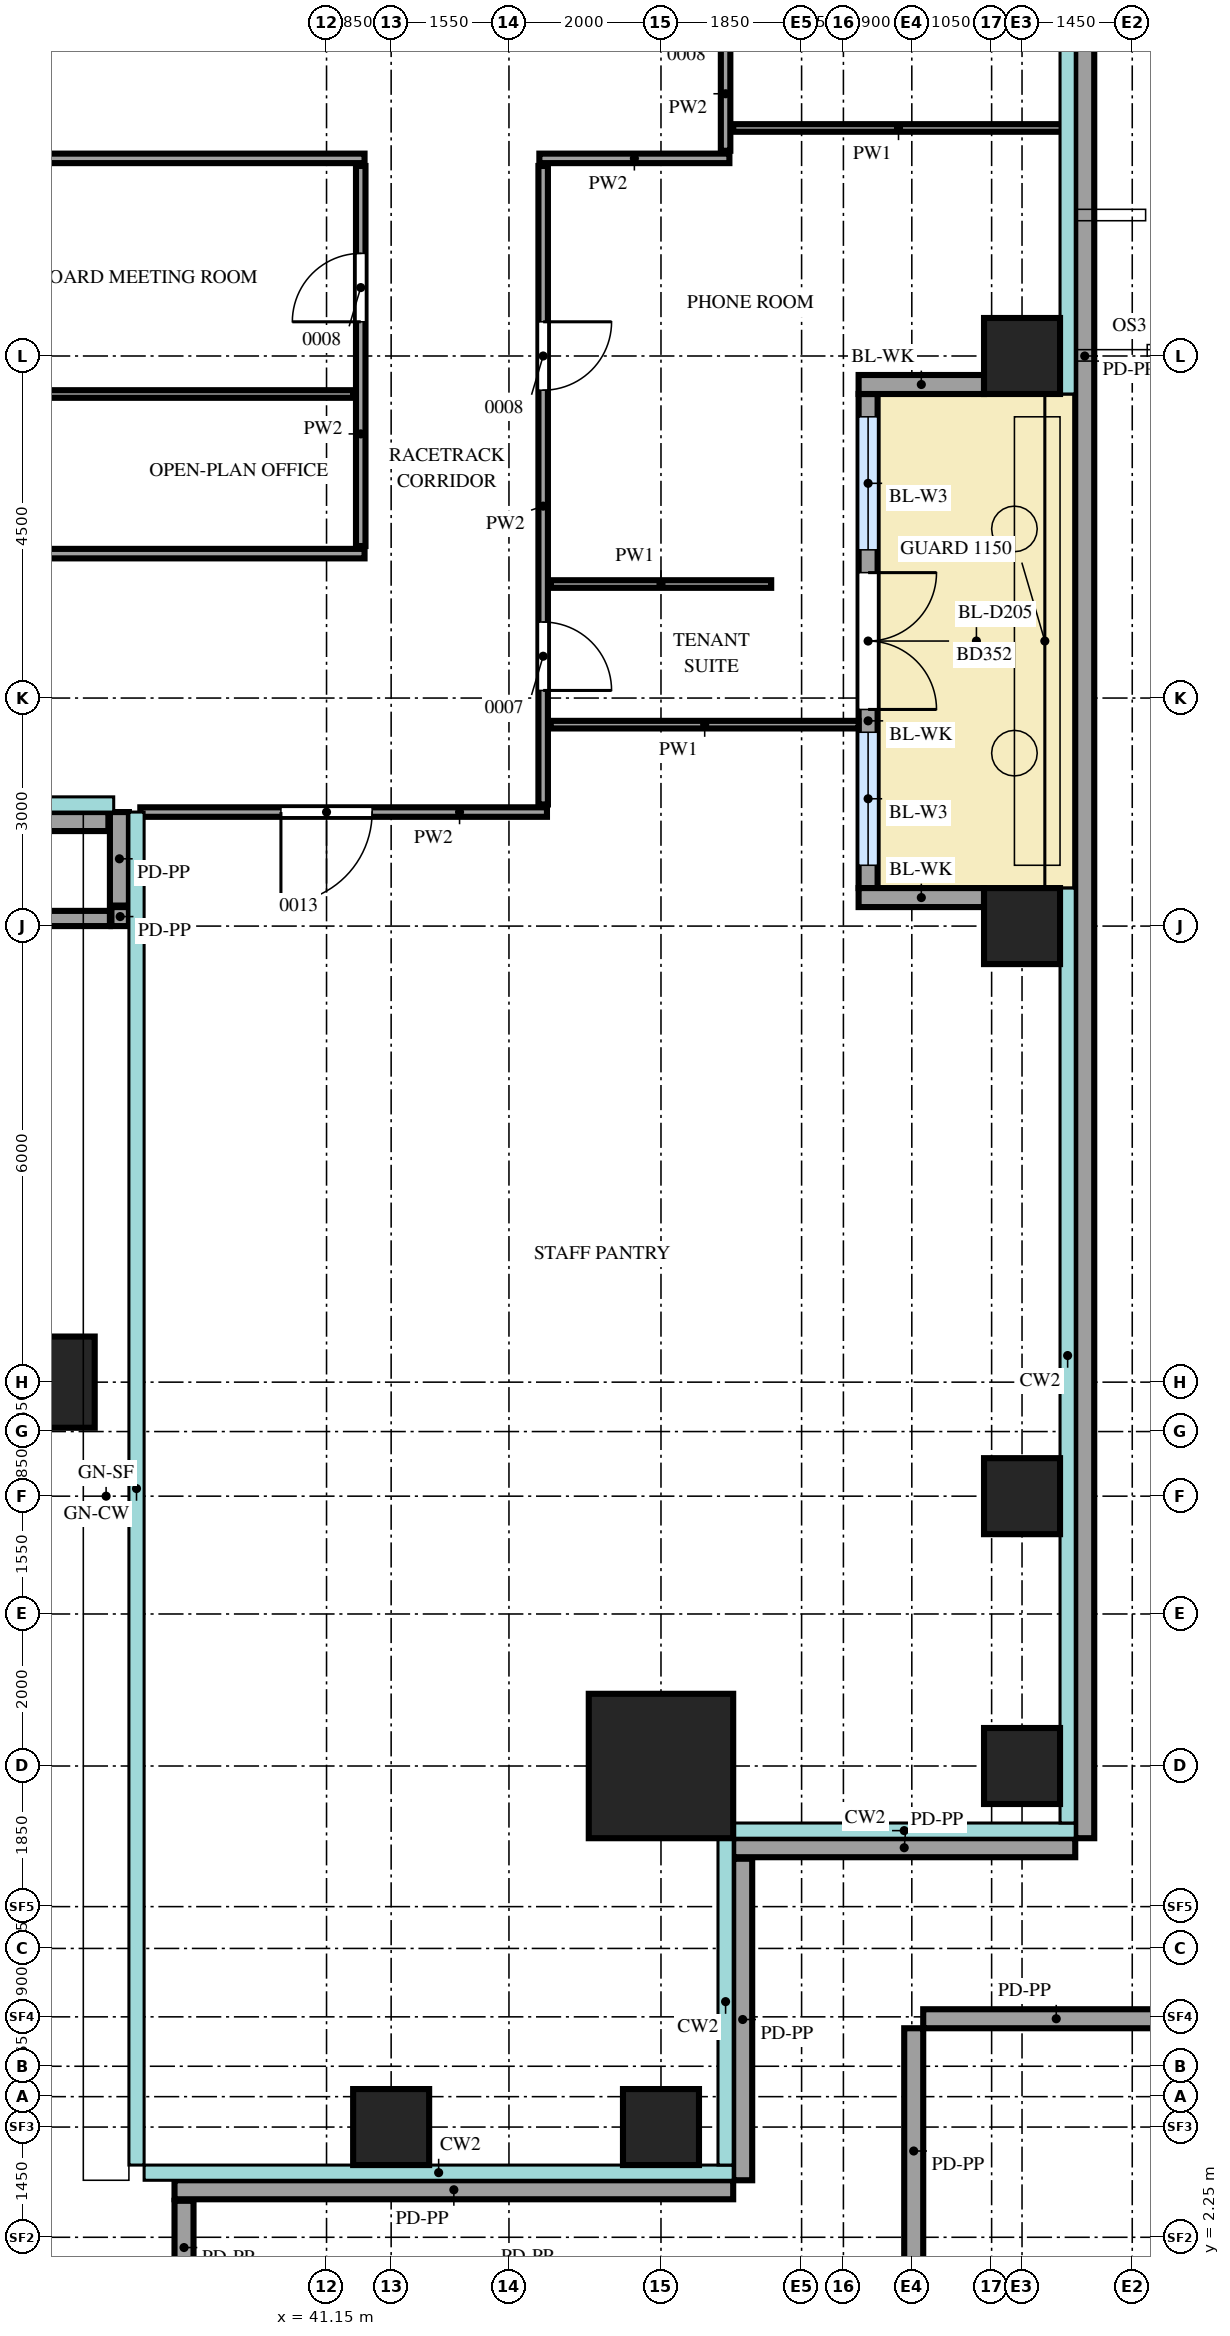
"""IFC4 building model, lengths in metres.
Left out: names, types, materials, properties, quantities, classifications, styles, units other than length and angle.
Written with IfcOpenShell. Run it as: python <this file> out.ifc"""

import sys

from ifc_helpers import new_model, si_unit, direction, frame, frame_2d, origin, origin_2d, place, context, subcontext, project, spatial, rectangle, extrude, source, transform, mapped, element, fill, save


model = new_model("IFC4")
c1 = context("Model", 3, precision=1e-05, world=origin(), true_north=direction((0.0, 1.0)))
c2 = subcontext(c1, "Body", "Model", "MODEL_VIEW")
j1 = project(units=[si_unit("LENGTHUNIT", "METRE"), si_unit("PLANEANGLEUNIT", "RADIAN")], contexts=[c1])
p1 = place(None, origin())
s1 = spatial("IfcSite", under=j1, at=p1, CompositionType="ELEMENT")
p2 = place(p1, origin())
s2 = spatial("IfcBuilding", under=s1, at=p2, CompositionType="ELEMENT")
p3 = place(p2, frame((0.0, 0.0, 164.7)))
s3 = spatial("IfcBuildingStorey", under=s2, at=p3, CompositionType="ELEMENT", Elevation=164.7)
m1 = source(origin(), c2, "Body", "SweptSolid", [
    extrude(rectangle(XDim=1.9, YDim=1.9, at=origin_2d()), origin(), (0.0, 0.0, 1.0), 4.0),
])
p4 = place(p3, frame((45.55, 8.45, 0.0), z_axis=(0.0, 0.0, 1.0), x_axis=(1.0, 0.0, 0.0)))
e1 = element("IfcColumn", 1, at=p4, inside=s3, PredefinedType="COLUMN", context=c2, shape_type="MappedRepresentation", body=[
    mapped(m1, transform((0.0, 0.0, 0.0))),
])
m2 = source(origin(), c2, "Body", "SweptSolid", [
    extrude(rectangle(XDim=1.0, YDim=1.0, at=origin_2d()), origin(), (0.0, 0.0, 1.0), 3.75),
])
for number, where, z_axis, x_axis in (
    (2, (42.0, 3.7, 0.0), (0.0, 0.0, 1.0), (1.0, 0.0, 0.0)),
    (3, (45.55, 3.7, 0.0), (0.0, 0.0, 1.0), (1.0, 0.0, 0.0)),
    (4, (50.3, 8.45, 0.0), (0.0, 0.0, 1.0), (1.0, 0.0, 0.0)),
    (5, (50.3, 12.0, 0.0), (0.0, 0.0, 1.0), (1.0, 0.0, 0.0)),
    (6, (50.3, 19.5, 0.0), (0.0, 0.0, 1.0), (1.0, 0.0, 0.0)),
    (7, (50.3, 27.0, 0.0), (0.0, 0.0, 1.0), (1.0, 0.0, 0.0)),
):
    element("IfcColumn", number, at=place(p3, frame(where, z_axis=z_axis, x_axis=x_axis)), inside=s3, PredefinedType="COLUMN", context=c2, shape_type="MappedRepresentation", body=[
        mapped(m2, transform((0.0, 0.0, 0.0))),
    ])
m3 = source(origin(), c2, "Body", "SweptSolid", [
    extrude(rectangle(XDim=1.2, YDim=1.2, at=origin_2d()), origin(), (0.0, 0.0, 1.0), 4.0),
])
p5 = place(p3, frame((37.5, 13.5, 0.0), z_axis=(0.0, 0.0, 1.0), x_axis=(1.0, 0.0, 0.0)))
e8 = element("IfcColumn", 8, at=p5, inside=s3, PredefinedType="COLUMN", context=c2, shape_type="MappedRepresentation", body=[
    mapped(m3, transform((0.0, 0.0, 0.0))),
])
m4 = source(origin(), c2, "Body", "SweptSolid", [
    extrude(rectangle(XDim=6.5, YDim=0.25, at=frame_2d((3.25, 0.0))), origin(), (0.0, 0.0, 1.0), 3.15),
])
p6 = place(p3, frame((48.275, 20.0, 0.0), z_axis=(0.0, 0.0, 1.0), x_axis=(0.0, 1.0, 0.0)))
e9 = element("IfcWall", 9, at=p6, inside=s3, PredefinedType="SOLIDWALL", context=c2, shape_type="MappedRepresentation", body=[
    mapped(m4, transform((0.0, 0.0, 0.0))),
])
m5 = source(origin(), c2, "Body", "SweptSolid", [
    extrude(rectangle(XDim=1.75, YDim=2.4, at=frame_2d((0.875, 1.2))), frame((0.0, 0.135, 0.0), z_axis=(0.0, -1.0, 0.0), x_axis=(1.0, 0.0, 0.0)), (0.0, 0.0, 1.0), 0.27),
])
p7 = place(p6, frame((0.3, 0.0, 0.0)))
e10 = element("IfcOpeningElement", 10, at=p7, cuts=e9, PredefinedType="OPENING", context=c2, shape_type="MappedRepresentation", body=[
    mapped(m5, transform((0.0, 0.0, 0.0))),
])
p8 = place(p6, frame((4.45, 0.0, 0.0)))
e11 = element("IfcOpeningElement", 11, at=p8, cuts=e9, PredefinedType="OPENING", context=c2, shape_type="MappedRepresentation", body=[
    mapped(m5, transform((0.0, 0.0, 0.0))),
])
m6 = source(origin(), c2, "Body", "SweptSolid", [
    extrude(rectangle(XDim=1.8, YDim=2.4, at=frame_2d((0.9, 1.2))), frame((0.0, 0.135, 0.0), z_axis=(0.0, -1.0, 0.0), x_axis=(1.0, 0.0, 0.0)), (0.0, 0.0, 1.0), 0.27),
])
p9 = place(p6, frame((2.35, 0.0, 0.0)))
e12 = element("IfcOpeningElement", 12, at=p9, cuts=e9, PredefinedType="OPENING", context=c2, shape_type="MappedRepresentation", body=[
    mapped(m6, transform((0.0, 0.0, 0.0))),
])
m7 = source(origin(), c2, "Body", "SweptSolid", [
    extrude(rectangle(XDim=1.65, YDim=0.25, at=frame_2d((0.825, 0.0))), origin(), (0.0, 0.0, 1.0), 3.15),
])
for number, where, z_axis, x_axis in (
    (13, (49.8, 19.875, 0.0), (0.0, 0.0, 1.0), (-1.0, 0.0, 0.0)),
    (14, (49.8, 26.625, 0.0), (0.0, 0.0, 1.0), (-1.0, 0.0, 0.0)),
):
    element("IfcWall", number, at=place(p3, frame(where, z_axis=z_axis, x_axis=x_axis)), inside=s3, PredefinedType="SOLIDWALL", context=c2, shape_type="MappedRepresentation", body=[
        mapped(m7, transform((0.0, 0.0, 0.0))),
    ])
m8 = source(origin(), c2, "Body", "SweptSolid", [
    extrude(rectangle(XDim=12.6, YDim=0.2, at=frame_2d((6.3, 0.0))), origin(), (0.0, 0.0, 1.0), 1.1),
])
p10 = place(p3, frame((38.3, 19.6, 0.0), z_axis=(0.0, 0.0, 1.0), x_axis=(-1.0, 0.0, 0.0)))
e15 = element("IfcWall", 15, at=p10, inside=s3, PredefinedType="SOLIDWALL", context=c2, shape_type="MappedRepresentation", body=[
    mapped(m8, transform((0.0, 0.0, 0.0))),
])
m9 = source(origin(), c2, "Body", "SweptSolid", [
    extrude(rectangle(XDim=39.0, YDim=0.25, at=frame_2d((19.5, 0.0))), origin(), (0.0, 0.0, 1.0), 1.1),
])
p11 = place(p3, frame((51.125, 46.5, 0.0), z_axis=(0.0, 0.0, 1.0), x_axis=(0.0, -1.0, 0.0)))
e16 = element("IfcWall", 16, at=p11, inside=s3, PredefinedType="SOLIDWALL", context=c2, shape_type="MappedRepresentation", body=[
    mapped(m9, transform((0.0, 0.0, 0.0))),
])
m10 = source(origin(), c2, "Body", "SweptSolid", [
    extrude(rectangle(XDim=4.5, YDim=0.25, at=frame_2d((2.25, 0.0))), origin(), (0.0, 0.0, 1.0), 1.1),
])
p12 = place(p3, frame((51.0, 7.375, 0.0), z_axis=(0.0, 0.0, 1.0), x_axis=(-1.0, 0.0, 0.0)))
e17 = element("IfcWall", 17, at=p12, inside=s3, PredefinedType="SOLIDWALL", context=c2, shape_type="MappedRepresentation", body=[
    mapped(m10, transform((0.0, 0.0, 0.0))),
])
m11 = source(origin(), c2, "Body", "SweptSolid", [
    extrude(rectangle(XDim=4.23, YDim=0.25, at=frame_2d((2.115, 0.0))), origin(), (0.0, 0.0, 1.0), 1.1),
])
p13 = place(p3, frame((46.625, 7.23, 0.0), z_axis=(0.0, 0.0, 1.0), x_axis=(0.0, -1.0, 0.0)))
e18 = element("IfcWall", 18, at=p13, inside=s3, PredefinedType="SOLIDWALL", context=c2, shape_type="MappedRepresentation", body=[
    mapped(m11, transform((0.0, 0.0, 0.0))),
])
m12 = source(origin(), c2, "Body", "SweptSolid", [
    extrude(rectangle(XDim=7.35, YDim=0.25, at=frame_2d((3.675, 0.0))), origin(), (0.0, 0.0, 1.0), 1.1),
])
p14 = place(p3, frame((46.5, 2.875, 0.0), z_axis=(0.0, 0.0, 1.0), x_axis=(-1.0, 0.0, 0.0)))
e19 = element("IfcWall", 19, at=p14, inside=s3, PredefinedType="SOLIDWALL", context=c2, shape_type="MappedRepresentation", body=[
    mapped(m12, transform((0.0, 0.0, 0.0))),
])
m13 = source(origin(), c2, "Body", "SweptSolid", [
    extrude(rectangle(XDim=1.23, YDim=0.25, at=frame_2d((0.615, 0.0))), origin(), (0.0, 0.0, 1.0), 1.1),
])
p15 = place(p3, frame((39.275, 2.73, 0.0), z_axis=(0.0, 0.0, 1.0), x_axis=(0.0, -1.0, 0.0)))
e20 = element("IfcWall", 20, at=p15, inside=s3, PredefinedType="SOLIDWALL", context=c2, shape_type="MappedRepresentation", body=[
    mapped(m13, transform((0.0, 0.0, 0.0))),
])
m14 = source(origin(), c2, "Body", "SweptSolid", [
    extrude(rectangle(XDim=3.23, YDim=0.25, at=frame_2d((1.615, 0.0))), origin(), (0.0, 0.0, 1.0), 1.1),
])
p16 = place(p3, frame((48.875, 1.77, 0.0), z_axis=(0.0, 0.0, 1.0), x_axis=(0.0, 1.0, 0.0)))
e21 = element("IfcWall", 21, at=p16, inside=s3, PredefinedType="SOLIDWALL", context=c2, shape_type="MappedRepresentation", body=[
    mapped(m14, transform((0.0, 0.0, 0.0))),
])
m15 = source(origin(), c2, "Body", "SweptSolid", [
    extrude(rectangle(XDim=3.5, YDim=0.25, at=frame_2d((1.75, 0.0))), origin(), (0.0, 0.0, 1.0), 1.1),
])
p17 = place(p3, frame((49.0, 5.125, 0.0), z_axis=(0.0, 0.0, 1.0), x_axis=(1.0, 0.0, 0.0)))
e22 = element("IfcWall", 22, at=p17, inside=s3, PredefinedType="SOLIDWALL", context=c2, shape_type="MappedRepresentation", body=[
    mapped(m15, transform((0.0, 0.0, 0.0))),
])
m16 = source(origin(), c2, "Body", "SweptSolid", [
    extrude(rectangle(XDim=0.23, YDim=0.25, at=frame_2d((0.115, 0.0))), origin(), (0.0, 0.0, 1.0), 1.1),
])
p18 = place(p3, frame((38.32, 19.625, 0.0), z_axis=(0.0, 0.0, 1.0), x_axis=(1.0, 0.0, 0.0)))
e23 = element("IfcWall", 23, at=p18, inside=s3, PredefinedType="SOLIDWALL", context=c2, shape_type="MappedRepresentation", body=[
    mapped(m16, transform((0.0, 0.0, 0.0))),
])
p19 = place(p3, frame((38.425, 19.77, 0.0), z_axis=(0.0, 0.0, 1.0), x_axis=(0.0, 1.0, 0.0)))
e24 = element("IfcWall", 24, at=p19, inside=s3, PredefinedType="SOLIDWALL", context=c2, shape_type="MappedRepresentation", body=[
    mapped(m13, transform((0.0, 0.0, 0.0))),
])
m17 = source(origin(), c2, "Body", "SweptSolid", [
    extrude(rectangle(XDim=12.83, YDim=0.25, at=frame_2d((6.415, 0.0))), origin(), (0.0, 0.0, 1.0), 1.1),
])
p20 = place(p3, frame((38.28, 20.875, 0.0), z_axis=(0.0, 0.0, 1.0), x_axis=(-1.0, 0.0, 0.0)))
e25 = element("IfcWall", 25, at=p20, inside=s3, PredefinedType="SOLIDWALL", context=c2, shape_type="MappedRepresentation", body=[
    mapped(m17, transform((0.0, 0.0, 0.0))),
])
m18 = source(origin(), c2, "Body", "SweptSolid", [
    extrude(rectangle(XDim=5.35, YDim=0.125, at=frame_2d((2.675, 0.0))), origin(), (0.0, 0.0, 1.0), 3.8),
])
p21 = place(p3, frame((38.7, 21.0, 0.0), z_axis=(0.0, 0.0, 1.0), x_axis=(1.0, 0.0, 0.0)))
e26 = element("IfcWall", 26, at=p21, inside=s3, PredefinedType="PARTITIONING", context=c2, shape_type="MappedRepresentation", body=[
    mapped(m18, transform((0.0, 0.0, 0.0))),
])
m19 = source(origin(), c2, "Body", "SweptSolid", [
    extrude(rectangle(XDim=1.2, YDim=2.1, at=frame_2d((0.6, 1.05))), frame((0.0, 0.073, 0.0), z_axis=(0.0, -1.0, 0.0), x_axis=(1.0, 0.0, 0.0)), (0.0, 0.0, 1.0), 0.145),
])
p22 = place(p21, frame((1.85, 0.0, 0.0)))
e27 = element("IfcOpeningElement", 27, at=p22, cuts=e26, PredefinedType="OPENING", context=c2, shape_type="MappedRepresentation", body=[
    mapped(m19, transform((0.0, 0.0, 0.0))),
])
m20 = source(origin(), c2, "Body", "SweptSolid", [
    extrude(rectangle(XDim=8.4, YDim=0.125, at=frame_2d((4.2, 0.0))), origin(), (0.0, 0.0, 1.0), 3.8),
])
p23 = place(p3, frame((44.0, 21.1, 0.0), z_axis=(0.0, 0.0, 1.0), x_axis=(0.0, 1.0, 0.0)))
e28 = element("IfcWall", 28, at=p23, inside=s3, PredefinedType="PARTITIONING", context=c2, shape_type="MappedRepresentation", body=[
    mapped(m20, transform((0.0, 0.0, 0.0))),
])
m21 = source(origin(), c2, "Body", "SweptSolid", [
    extrude(rectangle(XDim=0.9, YDim=2.1, at=frame_2d((0.45, 1.05))), frame((0.0, 0.073, 0.0), z_axis=(0.0, -1.0, 0.0), x_axis=(1.0, 0.0, 0.0)), (0.0, 0.0, 1.0), 0.145),
])
p24 = place(p23, frame((1.5, 0.0, 0.0)))
e29 = element("IfcOpeningElement", 29, at=p24, cuts=e28, PredefinedType="OPENING", context=c2, shape_type="MappedRepresentation", body=[
    mapped(m21, transform((0.0, 0.0, 0.0))),
])
p25 = place(p23, frame((5.45, 0.0, 0.0)))
e30 = element("IfcOpeningElement", 30, at=p25, cuts=e28, PredefinedType="OPENING", context=c2, shape_type="MappedRepresentation", body=[
    mapped(m21, transform((0.0, 0.0, 0.0))),
])
m22 = source(origin(), c2, "Body", "SweptSolid", [
    extrude(rectangle(XDim=4.05, YDim=0.1, at=frame_2d((2.025, 0.0))), origin(), (0.0, 0.0, 1.0), 3.8),
])
p26 = place(p3, frame((44.1, 22.15, 0.0), z_axis=(0.0, 0.0, 1.0), x_axis=(1.0, 0.0, 0.0)))
e31 = element("IfcWall", 31, at=p26, inside=s3, PredefinedType="PARTITIONING", context=c2, shape_type="MappedRepresentation", body=[
    mapped(m22, transform((0.0, 0.0, 0.0))),
])
m23 = source(origin(), c2, "Body", "SweptSolid", [
    extrude(rectangle(XDim=2.9, YDim=0.1, at=frame_2d((1.45, 0.0))), origin(), (0.0, 0.0, 1.0), 3.8),
])
p27 = place(p3, frame((44.1, 24.0, 0.0), z_axis=(0.0, 0.0, 1.0), x_axis=(1.0, 0.0, 0.0)))
e32 = element("IfcWall", 32, at=p27, inside=s3, PredefinedType="PARTITIONING", context=c2, shape_type="MappedRepresentation", body=[
    mapped(m23, transform((0.0, 0.0, 0.0))),
])
m24 = source(origin(), c2, "Body", "SweptSolid", [
    extrude(rectangle(XDim=18.3, YDim=0.125, at=frame_2d((9.15, 0.0))), origin(), (0.0, 0.0, 1.0), 3.8),
])
p28 = place(p3, frame((23.35, 24.4, 0.0), z_axis=(0.0, 0.0, 1.0), x_axis=(1.0, 0.0, 0.0)))
e33 = element("IfcWall", 33, at=p28, inside=s3, PredefinedType="PARTITIONING", context=c2, shape_type="MappedRepresentation", body=[
    mapped(m24, transform((0.0, 0.0, 0.0))),
])
m25 = source(origin(), c2, "Body", "SweptSolid", [
    extrude(rectangle(XDim=5.0, YDim=0.125, at=frame_2d((2.5, 0.0))), origin(), (0.0, 0.0, 1.0), 3.8),
])
p29 = place(p3, frame((41.6, 24.5, 0.0), z_axis=(0.0, 0.0, 1.0), x_axis=(0.0, 1.0, 0.0)))
e34 = element("IfcWall", 34, at=p29, inside=s3, PredefinedType="PARTITIONING", context=c2, shape_type="MappedRepresentation", body=[
    mapped(m25, transform((0.0, 0.0, 0.0))),
])
p30 = place(p29, frame((2.95, 0.0, 0.0)))
e35 = element("IfcOpeningElement", 35, at=p30, cuts=e34, PredefinedType="OPENING", context=c2, shape_type="MappedRepresentation", body=[
    mapped(m21, transform((0.0, 0.0, 0.0))),
])
m26 = source(origin(), c2, "Body", "SweptSolid", [
    extrude(rectangle(XDim=18.0, YDim=0.1, at=frame_2d((9.0, 0.0))), origin(), (0.0, 0.0, 1.0), 3.8),
])
p31 = place(p3, frame((23.5, 26.5, 0.0), z_axis=(0.0, 0.0, 1.0), x_axis=(1.0, 0.0, 0.0)))
e36 = element("IfcWall", 36, at=p31, inside=s3, PredefinedType="PARTITIONING", context=c2, shape_type="MappedRepresentation", body=[
    mapped(m26, transform((0.0, 0.0, 0.0))),
])
p32 = place(p3, frame((23.35, 29.6, 0.0), z_axis=(0.0, 0.0, 1.0), x_axis=(1.0, 0.0, 0.0)))
e37 = element("IfcWall", 37, at=p32, inside=s3, PredefinedType="PARTITIONING", context=c2, shape_type="MappedRepresentation", body=[
    mapped(m24, transform((0.0, 0.0, 0.0))),
])
m27 = source(origin(), c2, "Body", "SweptSolid", [
    extrude(rectangle(XDim=2.5, YDim=0.125, at=frame_2d((1.25, 0.0))), origin(), (0.0, 0.0, 1.0), 3.8),
])
p33 = place(p3, frame((43.95, 29.6, 0.0), z_axis=(0.0, 0.0, 1.0), x_axis=(1.0, 0.0, 0.0)))
e38 = element("IfcWall", 38, at=p33, inside=s3, PredefinedType="PARTITIONING", context=c2, shape_type="MappedRepresentation", body=[
    mapped(m27, transform((0.0, 0.0, 0.0))),
])
m28 = source(origin(), c2, "Body", "SweptSolid", [
    extrude(rectangle(XDim=3.2, YDim=0.125, at=frame_2d((1.6, 0.0))), origin(), (0.0, 0.0, 1.0), 3.8),
])
p34 = place(p3, frame((46.4, 29.7, 0.0), z_axis=(0.0, 0.0, 1.0), x_axis=(0.0, 1.0, 0.0)))
e39 = element("IfcWall", 39, at=p34, inside=s3, PredefinedType="PARTITIONING", context=c2, shape_type="MappedRepresentation", body=[
    mapped(m28, transform((0.0, 0.0, 0.0))),
])
p35 = place(p34, frame((1.5, 0.0, 0.0)))
e40 = element("IfcOpeningElement", 40, at=p35, cuts=e39, PredefinedType="OPENING", context=c2, shape_type="MappedRepresentation", body=[
    mapped(m21, transform((0.0, 0.0, 0.0))),
])
m29 = source(origin(), c2, "Body", "SweptSolid", [
    extrude(rectangle(XDim=4.35, YDim=0.1, at=frame_2d((2.175, 0.0))), origin(), (0.0, 0.0, 1.0), 3.8),
])
p36 = place(p3, frame((46.5, 30.0, 0.0), z_axis=(0.0, 0.0, 1.0), x_axis=(1.0, 0.0, 0.0)))
e41 = element("IfcWall", 41, at=p36, inside=s3, PredefinedType="PARTITIONING", context=c2, shape_type="MappedRepresentation", body=[
    mapped(m29, transform((0.0, 0.0, 0.0))),
])
m30 = source(origin(), c2, "Body", "SweptSolid", [
    extrude(rectangle(XDim=1.75, YDim=2.4, at=frame_2d((0.875, 1.2))), frame((0.0, 0.03, 0.0), z_axis=(0.0, -1.0, 0.0), x_axis=(1.0, 0.0, 0.0)), (0.0, 0.0, 1.0), 0.06),
])
p37 = place(p7, origin())
e42 = element("IfcWindow", 42, at=p37, inside=s3, PartitioningType="SINGLE_PANEL", PredefinedType="WINDOW", context=c2, shape_type="MappedRepresentation", body=[
    mapped(m30, transform((0.0, 0.0, 0.0))),
])
fill(e10, e42)
p38 = place(p8, origin())
e43 = element("IfcWindow", 43, at=p38, inside=s3, PartitioningType="SINGLE_PANEL", PredefinedType="WINDOW", context=c2, shape_type="MappedRepresentation", body=[
    mapped(m30, transform((0.0, 0.0, 0.0))),
])
fill(e11, e43)
m31 = source(origin(), c2, "Body", "SweptSolid", [
    extrude(rectangle(XDim=1.8, YDim=2.4, at=frame_2d((0.9, 1.2))), frame((0.0, 0.025, 0.0), z_axis=(0.0, -1.0, 0.0), x_axis=(1.0, 0.0, 0.0)), (0.0, 0.0, 1.0), 0.05),
])
p39 = place(p9, origin())
e44 = element("IfcDoor", 44, at=p39, inside=s3, OperationType="DOUBLE_DOOR_DOUBLE_SWING", PredefinedType="DOOR", context=c2, shape_type="MappedRepresentation", body=[
    mapped(m31, transform((0.0, 0.0, 0.0))),
])
fill(e12, e44)
m32 = source(origin(), c2, "Body", "SweptSolid", [
    extrude(rectangle(XDim=1.2, YDim=2.1, at=frame_2d((0.6, 1.05))), frame((0.0, 0.025, 0.0), z_axis=(0.0, -1.0, 0.0), x_axis=(1.0, 0.0, 0.0)), (0.0, 0.0, 1.0), 0.05),
])
p40 = place(p22, origin())
e45 = element("IfcDoor", 45, at=p40, inside=s3, OperationType="SINGLE_SWING_LEFT", PredefinedType="DOOR", context=c2, shape_type="MappedRepresentation", body=[
    mapped(m32, transform((0.0, 0.0, 0.0))),
])
fill(e27, e45)
m33 = source(origin(), c2, "Body", "SweptSolid", [
    extrude(rectangle(XDim=0.9, YDim=2.1, at=frame_2d((0.45, 1.05))), frame((0.0, 0.025, 0.0), z_axis=(0.0, -1.0, 0.0), x_axis=(1.0, 0.0, 0.0)), (0.0, 0.0, 1.0), 0.05),
])
p41 = place(p24, origin())
e46 = element("IfcDoor", 46, at=p41, inside=s3, OperationType="SINGLE_SWING_LEFT", PredefinedType="DOOR", context=c2, shape_type="MappedRepresentation", body=[
    mapped(m33, transform((0.0, 0.0, 0.0))),
])
fill(e29, e46)
p42 = place(p25, origin())
e47 = element("IfcDoor", 47, at=p42, inside=s3, OperationType="SINGLE_SWING_RIGHT", PredefinedType="DOOR", context=c2, shape_type="MappedRepresentation", body=[
    mapped(m33, transform((0.0, 0.0, 0.0))),
])
fill(e30, e47)
p43 = place(p30, origin())
e48 = element("IfcDoor", 48, at=p43, inside=s3, OperationType="SINGLE_SWING_RIGHT", PredefinedType="DOOR", context=c2, shape_type="MappedRepresentation", body=[
    mapped(m33, transform((0.0, 0.0, 0.0))),
])
fill(e35, e48)
save(model, sys.argv[1])
